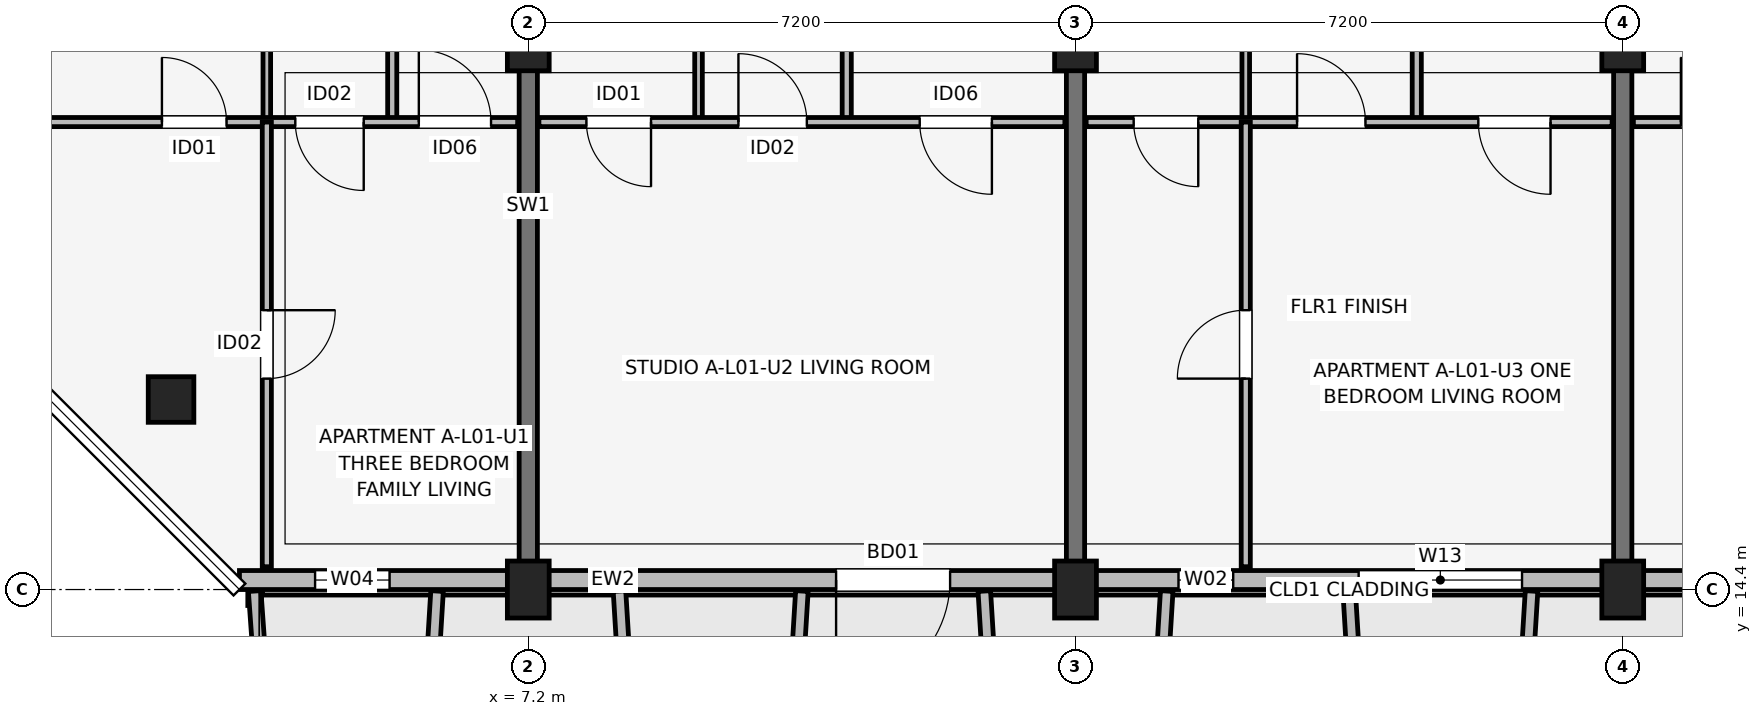
"""IFC4 building model, lengths in metres.
Left out: names, types, materials, properties, quantities, classifications, styles, units other than length and angle.
Written with IfcOpenShell. Run it as: python <this file> out.ifc"""

import sys

from ifc_helpers import new_model, si_unit, direction, frame, frame_2d, origin, origin_2d, place, context, subcontext, project, spatial, rectangle, extrude, element, fill, save


model = new_model("IFC4")
c1 = context("Model", 3, precision=1e-05, world=origin(), true_north=direction((0.0, 1.0)))
c2 = subcontext(c1, "Body", "Model", "MODEL_VIEW")
j1 = project(units=[si_unit("LENGTHUNIT", "METRE"), si_unit("PLANEANGLEUNIT", "RADIAN")], contexts=[c1])
p1 = place(None, origin())
s1 = spatial("IfcSite", under=j1, at=p1, CompositionType="ELEMENT")
p2 = place(p1, origin())
s2 = spatial("IfcBuilding", under=s1, at=p2, CompositionType="ELEMENT")
p3 = place(p2, frame((0.0, 0.0, 4.5)))
s3 = spatial("IfcBuildingStorey", under=s2, at=p3, CompositionType="ELEMENT", Elevation=4.5)
p4 = place(p3, frame((2.5, 16.9, 0.0), z_axis=(0.0, 0.0, 1.0), x_axis=(1.0, 0.0, 0.0)))
e1 = element("IfcColumn", 1, at=p4, inside=s3, PredefinedType="COLUMN", context=c2, shape_type="SweptSolid", body=[
    extrude(rectangle(XDim=0.6, YDim=0.6, at=origin_2d()), origin(), (0.0, 0.0, 1.0), 4.2),
])
for number, where, z_axis, x_axis in (
    (2, (7.2, 14.4, 0.0), (0.0, 0.0, 1.0), (1.0, 0.0, 0.0)),
    (3, (7.2, 21.6, 0.0), (0.0, 0.0, 1.0), (1.0, 0.0, 0.0)),
    (4, (14.4, 14.4, 0.0), (0.0, 0.0, 1.0), (1.0, 0.0, 0.0)),
    (5, (14.4, 21.6, 0.0), (0.0, 0.0, 1.0), (1.0, 0.0, 0.0)),
    (6, (21.6, 14.4, 0.0), (0.0, 0.0, 1.0), (1.0, 0.0, 0.0)),
    (7, (21.6, 21.6, 0.0), (0.0, 0.0, 1.0), (1.0, 0.0, 0.0)),
):
    element("IfcColumn", number, at=place(p3, frame(where, z_axis=z_axis, x_axis=x_axis)), inside=s3, PredefinedType="COLUMN", context=c2, shape_type="SweptSolid", body=[
        extrude(rectangle(XDim=0.55, YDim=0.75, at=origin_2d()), origin(), (0.0, 0.0, 1.0), 4.2),
    ])
for number, where, z_axis, x_axis in (
    (8, (7.2, 14.75, 0.0), (0.0, 0.0, 1.0), (0.0, 1.0, 0.0)),
    (9, (14.4, 14.75, 0.0), (0.0, 0.0, 1.0), (0.0, 1.0, 0.0)),
    (10, (21.6, 14.75, 0.0), (0.0, 0.0, 1.0), (0.0, 1.0, 0.0)),
):
    element("IfcWall", number, at=place(p3, frame(where, z_axis=z_axis, x_axis=x_axis)), inside=s3, PredefinedType="SHEAR", context=c2, shape_type="SweptSolid", body=[
        extrude(rectangle(XDim=9.4, YDim=0.24, at=frame_2d((4.7, 0.0))), origin(), (0.0, 0.0, 1.0), 4.2),
    ])
p5 = place(p3, frame((3.4, 14.525, 0.0), z_axis=(0.0, 0.0, 1.0), x_axis=(1.0, 0.0, 0.0)))
e11 = element("IfcWall", 11, at=p5, inside=s3, PredefinedType="SOLIDWALL", context=c2, shape_type="SweptSolid", body=[
    extrude(rectangle(XDim=29.2, YDim=0.25, at=frame_2d((14.6, 0.0))), origin(), (0.0, 0.0, 1.0), 3.48),
])
p6 = place(p5, frame((9.35, 0.0, 0.0), z_axis=(0.0, 0.0, 1.0), x_axis=(-1.0, 0.0, 0.0)))
e12 = element("IfcOpeningElement", 12, at=p6, cuts=e11, PredefinedType="OPENING", context=c2, shape_type="SweptSolid", body=[
    extrude(rectangle(XDim=1.5, YDim=2.15, at=frame_2d((0.75, 1.075))), frame((0.0, 0.135, 0.0), z_axis=(0.0, -1.0, 0.0), x_axis=(1.0, 0.0, 0.0)), (0.0, 0.0, 1.0), 0.27),
])
p7 = place(p5, frame((23.9, 0.0, 0.0), z_axis=(0.0, 0.0, 1.0), x_axis=(-1.0, 0.0, 0.0)))
e13 = element("IfcOpeningElement", 13, at=p7, cuts=e11, PredefinedType="OPENING", context=c2, shape_type="SweptSolid", body=[
    extrude(rectangle(XDim=1.8, YDim=2.15, at=frame_2d((0.9, 1.075))), frame((0.0, 0.135, 0.0), z_axis=(0.0, -1.0, 0.0), x_axis=(1.0, 0.0, 0.0)), (0.0, 0.0, 1.0), 0.27),
])
p8 = place(p5, frame((0.995, 0.0, 0.75)))
e14 = element("IfcOpeningElement", 14, at=p8, cuts=e11, PredefinedType="OPENING", context=c2, shape_type="SweptSolid", body=[
    extrude(rectangle(XDim=0.98, YDim=1.45, at=frame_2d((0.49, 0.725))), frame((0.0, 0.135, 0.0), z_axis=(0.0, -1.0, 0.0), x_axis=(1.0, 0.0, 0.0)), (0.0, 0.0, 1.0), 0.27),
])
p9 = place(p5, frame((12.355, 0.0, 0.75)))
e15 = element("IfcOpeningElement", 15, at=p9, cuts=e11, PredefinedType="OPENING", context=c2, shape_type="SweptSolid", body=[
    extrude(rectangle(XDim=0.72, YDim=1.35, at=frame_2d((0.36, 0.675))), frame((0.0, 0.135, 0.0), z_axis=(0.0, -1.0, 0.0), x_axis=(1.0, 0.0, 0.0)), (0.0, 0.0, 1.0), 0.27),
])
p10 = place(p5, frame((14.725, 0.0, 0.7)))
e16 = element("IfcOpeningElement", 16, at=p10, cuts=e11, PredefinedType="OPENING", context=c2, shape_type="SweptSolid", body=[
    extrude(rectangle(XDim=2.15, YDim=1.65, at=frame_2d((1.075, 0.825))), frame((0.0, 0.135, 0.0), z_axis=(0.0, -1.0, 0.0), x_axis=(1.0, 0.0, 0.0)), (0.0, 0.0, 1.0), 0.27),
])
p11 = place(p3, frame((3.6, 14.38, 0.0), z_axis=(0.0, 0.0, 1.0), x_axis=(0.071194071069, -0.997462482625, 0.0)))
e17 = element("IfcWall", 17, at=p11, inside=s3, PredefinedType="ELEMENTEDWALL", context=c2, shape_type="SweptSolid", body=[
    extrude(rectangle(XDim=1.965, YDim=0.165, at=frame_2d((0.982, 0.0))), origin(), (0.0, 0.0, 1.0), 4.0),
])
p12 = place(p3, frame((6.0, 14.38, 0.0), z_axis=(0.0, 0.0, 1.0), x_axis=(-0.061170732449, -0.998127317276, 0.0)))
e18 = element("IfcWall", 18, at=p12, inside=s3, PredefinedType="ELEMENTEDWALL", context=c2, shape_type="SweptSolid", body=[
    extrude(rectangle(XDim=1.964, YDim=0.165, at=frame_2d((0.982, 0.0))), origin(), (0.0, 0.0, 1.0), 4.0),
])
for number, where, z_axis, x_axis in (
    (19, (8.4, 14.38, 0.0), (0.0, 0.0, 1.0), (0.061, -0.998, 0.0)),
    (20, (10.8, 14.38, 0.0), (0.0, 0.0, 1.0), (-0.061, -0.998, 0.0)),
    (21, (13.2, 14.38, 0.0), (0.0, 0.0, 1.0), (0.061, -0.998, 0.0)),
):
    element("IfcWall", number, at=place(p3, frame(where, z_axis=z_axis, x_axis=x_axis)), inside=s3, PredefinedType="ELEMENTEDWALL", context=c2, shape_type="SweptSolid", body=[
        extrude(rectangle(XDim=1.964, YDim=0.165, at=frame_2d((0.982, 0.0))), origin(), (0.0, 0.0, 1.0), 3.58),
    ])
for number, where, z_axis, x_axis in (
    (22, (15.6, 14.38, 0.0), (0.0, 0.0, 1.0), (-0.061, -0.998, 0.0)),
    (23, (18.0, 14.38, 0.0), (0.0, 0.0, 1.0), (0.061, -0.998, 0.0)),
    (24, (20.4, 14.38, 0.0), (0.0, 0.0, 1.0), (-0.061, -0.998, 0.0)),
):
    element("IfcWall", number, at=place(p3, frame(where, z_axis=z_axis, x_axis=x_axis)), inside=s3, PredefinedType="ELEMENTEDWALL", context=c2, shape_type="SweptSolid", body=[
        extrude(rectangle(XDim=1.964, YDim=0.165, at=frame_2d((0.982, 0.0))), origin(), (0.0, 0.0, 1.0), 3.6),
    ])
p13 = place(p3, frame((3.76, 20.55, 0.0), z_axis=(0.0, 0.0, 1.0), x_axis=(0.0, 1.0, 0.0)))
e25 = element("IfcWall", 25, at=p13, inside=s3, PredefinedType="PARTITIONING", context=c2, shape_type="SweptSolid", body=[
    extrude(rectangle(XDim=3.75, YDim=0.1, at=frame_2d((1.875, 0.0))), origin(), (0.0, 0.0, 1.0), 3.25),
])
p14 = place(p3, frame((5.41, 20.55, 0.0), z_axis=(0.0, 0.0, 1.0), x_axis=(0.0, 1.0, 0.0)))
e26 = element("IfcWall", 26, at=p14, inside=s3, PredefinedType="PARTITIONING", context=c2, shape_type="SweptSolid", body=[
    extrude(rectangle(XDim=3.75, YDim=0.12, at=frame_2d((1.875, 0.0))), origin(), (0.0, 0.0, 1.0), 3.25),
])
p15 = place(p3, frame((0.14, 20.55, 0.0), z_axis=(0.0, 0.0, 1.0), x_axis=(1.0, 0.0, 0.0)))
e27 = element("IfcWall", 27, at=p15, inside=s3, PredefinedType="PARTITIONING", context=c2, shape_type="SweptSolid", body=[
    extrude(rectangle(XDim=6.92, YDim=0.12, at=frame_2d((3.46, 0.0))), origin(), (0.0, 0.0, 1.0), 3.25),
])
p16 = place(p15, frame((2.24, 0.0, 0.0)))
e28 = element("IfcOpeningElement", 28, at=p16, cuts=e27, PredefinedType="OPENING", context=c2, shape_type="SweptSolid", body=[
    extrude(rectangle(XDim=0.85, YDim=2.08, at=frame_2d((0.425, 1.04))), frame((0.0, 0.07, 0.0), z_axis=(0.0, -1.0, 0.0), x_axis=(1.0, 0.0, 0.0)), (0.0, 0.0, 1.0), 0.14),
])
p17 = place(p15, frame((4.895, 0.0, 0.0), z_axis=(0.0, 0.0, 1.0), x_axis=(-1.0, 0.0, 0.0)))
e29 = element("IfcOpeningElement", 29, at=p17, cuts=e27, PredefinedType="OPENING", context=c2, shape_type="SweptSolid", body=[
    extrude(rectangle(XDim=0.9, YDim=2.08, at=frame_2d((0.45, 1.04))), frame((0.0, 0.07, 0.0), z_axis=(0.0, -1.0, 0.0), x_axis=(1.0, 0.0, 0.0)), (0.0, 0.0, 1.0), 0.14),
])
p18 = place(p15, frame((5.62, 0.0, 0.0)))
e30 = element("IfcOpeningElement", 30, at=p18, cuts=e27, PredefinedType="OPENING", context=c2, shape_type="SweptSolid", body=[
    extrude(rectangle(XDim=0.95, YDim=2.08, at=frame_2d((0.475, 1.04))), frame((0.0, 0.07, 0.0), z_axis=(0.0, -1.0, 0.0), x_axis=(1.0, 0.0, 0.0)), (0.0, 0.0, 1.0), 0.14),
])
p19 = place(p3, frame((3.76, 14.7, 0.0), z_axis=(0.0, 0.0, 1.0), x_axis=(0.0, 1.0, 0.0)))
e31 = element("IfcWall", 31, at=p19, inside=s3, PredefinedType="PARTITIONING", context=c2, shape_type="SweptSolid", body=[
    extrude(rectangle(XDim=5.85, YDim=0.12, at=frame_2d((2.925, 0.0))), origin(), (0.0, 0.0, 1.0), 3.25),
])
p20 = place(p19, frame((3.375, 0.0, 0.0), z_axis=(0.0, 0.0, 1.0), x_axis=(-1.0, 0.0, 0.0)))
e32 = element("IfcOpeningElement", 32, at=p20, cuts=e31, PredefinedType="OPENING", context=c2, shape_type="SweptSolid", body=[
    extrude(rectangle(XDim=0.9, YDim=2.08, at=frame_2d((0.45, 1.04))), frame((0.0, 0.07, 0.0), z_axis=(0.0, -1.0, 0.0), x_axis=(1.0, 0.0, 0.0)), (0.0, 0.0, 1.0), 0.14),
])
p21 = place(p3, frame((9.44, 20.55, 0.0), z_axis=(0.0, 0.0, 1.0), x_axis=(0.0, 1.0, 0.0)))
e33 = element("IfcWall", 33, at=p21, inside=s3, PredefinedType="PARTITIONING", context=c2, shape_type="SweptSolid", body=[
    extrude(rectangle(XDim=3.75, YDim=0.1, at=frame_2d((1.875, 0.0))), origin(), (0.0, 0.0, 1.0), 3.25),
])
p22 = place(p3, frame((11.39, 20.55, 0.0), z_axis=(0.0, 0.0, 1.0), x_axis=(0.0, 1.0, 0.0)))
e34 = element("IfcWall", 34, at=p22, inside=s3, PredefinedType="PARTITIONING", context=c2, shape_type="SweptSolid", body=[
    extrude(rectangle(XDim=3.75, YDim=0.12, at=frame_2d((1.875, 0.0))), origin(), (0.0, 0.0, 1.0), 3.25),
])
p23 = place(p3, frame((7.34, 20.55, 0.0), z_axis=(0.0, 0.0, 1.0), x_axis=(1.0, 0.0, 0.0)))
e35 = element("IfcWall", 35, at=p23, inside=s3, PredefinedType="PARTITIONING", context=c2, shape_type="SweptSolid", body=[
    extrude(rectangle(XDim=6.92, YDim=0.12, at=frame_2d((3.46, 0.0))), origin(), (0.0, 0.0, 1.0), 3.25),
])
p24 = place(p23, frame((1.475, 0.0, 0.0), z_axis=(0.0, 0.0, 1.0), x_axis=(-1.0, 0.0, 0.0)))
e36 = element("IfcOpeningElement", 36, at=p24, cuts=e35, PredefinedType="OPENING", context=c2, shape_type="SweptSolid", body=[
    extrude(rectangle(XDim=0.85, YDim=2.08, at=frame_2d((0.425, 1.04))), frame((0.0, 0.07, 0.0), z_axis=(0.0, -1.0, 0.0), x_axis=(1.0, 0.0, 0.0)), (0.0, 0.0, 1.0), 0.14),
])
p25 = place(p23, frame((2.625, 0.0, 0.0)))
e37 = element("IfcOpeningElement", 37, at=p25, cuts=e35, PredefinedType="OPENING", context=c2, shape_type="SweptSolid", body=[
    extrude(rectangle(XDim=0.9, YDim=2.08, at=frame_2d((0.45, 1.04))), frame((0.0, 0.07, 0.0), z_axis=(0.0, -1.0, 0.0), x_axis=(1.0, 0.0, 0.0)), (0.0, 0.0, 1.0), 0.14),
])
p26 = place(p23, frame((5.96, 0.0, 0.0), z_axis=(0.0, 0.0, 1.0), x_axis=(-1.0, 0.0, 0.0)))
e38 = element("IfcOpeningElement", 38, at=p26, cuts=e35, PredefinedType="OPENING", context=c2, shape_type="SweptSolid", body=[
    extrude(rectangle(XDim=0.95, YDim=2.08, at=frame_2d((0.475, 1.04))), frame((0.0, 0.07, 0.0), z_axis=(0.0, -1.0, 0.0), x_axis=(1.0, 0.0, 0.0)), (0.0, 0.0, 1.0), 0.14),
])
p27 = place(p3, frame((16.64, 20.55, 0.0), z_axis=(0.0, 0.0, 1.0), x_axis=(0.0, 1.0, 0.0)))
e39 = element("IfcWall", 39, at=p27, inside=s3, PredefinedType="PARTITIONING", context=c2, shape_type="SweptSolid", body=[
    extrude(rectangle(XDim=3.75, YDim=0.1, at=frame_2d((1.875, 0.0))), origin(), (0.0, 0.0, 1.0), 3.25),
])
p28 = place(p3, frame((18.89, 20.55, 0.0), z_axis=(0.0, 0.0, 1.0), x_axis=(0.0, 1.0, 0.0)))
e40 = element("IfcWall", 40, at=p28, inside=s3, PredefinedType="PARTITIONING", context=c2, shape_type="SweptSolid", body=[
    extrude(rectangle(XDim=3.75, YDim=0.12, at=frame_2d((1.875, 0.0))), origin(), (0.0, 0.0, 1.0), 3.25),
])
p29 = place(p3, frame((14.54, 20.55, 0.0), z_axis=(0.0, 0.0, 1.0), x_axis=(1.0, 0.0, 0.0)))
e41 = element("IfcWall", 41, at=p29, inside=s3, PredefinedType="PARTITIONING", context=c2, shape_type="SweptSolid", body=[
    extrude(rectangle(XDim=6.92, YDim=0.12, at=frame_2d((3.46, 0.0))), origin(), (0.0, 0.0, 1.0), 3.25),
])
p30 = place(p29, frame((1.475, 0.0, 0.0), z_axis=(0.0, 0.0, 1.0), x_axis=(-1.0, 0.0, 0.0)))
e42 = element("IfcOpeningElement", 42, at=p30, cuts=e41, PredefinedType="OPENING", context=c2, shape_type="SweptSolid", body=[
    extrude(rectangle(XDim=0.85, YDim=2.08, at=frame_2d((0.425, 1.04))), frame((0.0, 0.07, 0.0), z_axis=(0.0, -1.0, 0.0), x_axis=(1.0, 0.0, 0.0)), (0.0, 0.0, 1.0), 0.14),
])
p31 = place(p29, frame((2.775, 0.0, 0.0)))
e43 = element("IfcOpeningElement", 43, at=p31, cuts=e41, PredefinedType="OPENING", context=c2, shape_type="SweptSolid", body=[
    extrude(rectangle(XDim=0.9, YDim=2.08, at=frame_2d((0.45, 1.04))), frame((0.0, 0.07, 0.0), z_axis=(0.0, -1.0, 0.0), x_axis=(1.0, 0.0, 0.0)), (0.0, 0.0, 1.0), 0.14),
])
p32 = place(p29, frame((6.11, 0.0, 0.0), z_axis=(0.0, 0.0, 1.0), x_axis=(-1.0, 0.0, 0.0)))
e44 = element("IfcOpeningElement", 44, at=p32, cuts=e41, PredefinedType="OPENING", context=c2, shape_type="SweptSolid", body=[
    extrude(rectangle(XDim=0.95, YDim=2.08, at=frame_2d((0.475, 1.04))), frame((0.0, 0.07, 0.0), z_axis=(0.0, -1.0, 0.0), x_axis=(1.0, 0.0, 0.0)), (0.0, 0.0, 1.0), 0.14),
])
p33 = place(p3, frame((16.64, 14.7, 0.0), z_axis=(0.0, 0.0, 1.0), x_axis=(0.0, 1.0, 0.0)))
e45 = element("IfcWall", 45, at=p33, inside=s3, PredefinedType="PARTITIONING", context=c2, shape_type="SweptSolid", body=[
    extrude(rectangle(XDim=5.85, YDim=0.12, at=frame_2d((2.925, 0.0))), origin(), (0.0, 0.0, 1.0), 3.25),
])
p34 = place(p33, frame((2.475, 0.0, 0.0)))
e46 = element("IfcOpeningElement", 46, at=p34, cuts=e45, PredefinedType="OPENING", context=c2, shape_type="SweptSolid", body=[
    extrude(rectangle(XDim=0.9, YDim=2.08, at=frame_2d((0.45, 1.04))), frame((0.0, 0.07, 0.0), z_axis=(0.0, -1.0, 0.0), x_axis=(1.0, 0.0, 0.0)), (0.0, 0.0, 1.0), 0.14),
])
p35 = place(p3, frame((21.74, 20.55, 0.0), z_axis=(0.0, 0.0, 1.0), x_axis=(1.0, 0.0, 0.0)))
e47 = element("IfcWall", 47, at=p35, inside=s3, PredefinedType="PARTITIONING", context=c2, shape_type="SweptSolid", body=[
    extrude(rectangle(XDim=6.92, YDim=0.12, at=frame_2d((3.46, 0.0))), origin(), (0.0, 0.0, 1.0), 3.25),
])
p36 = place(p35, frame((0.625, 0.0, 0.0)))
e48 = element("IfcOpeningElement", 48, at=p36, cuts=e47, PredefinedType="OPENING", context=c2, shape_type="SweptSolid", body=[
    extrude(rectangle(XDim=0.85, YDim=2.08, at=frame_2d((0.425, 1.04))), frame((0.0, 0.07, 0.0), z_axis=(0.0, -1.0, 0.0), x_axis=(1.0, 0.0, 0.0)), (0.0, 0.0, 1.0), 0.14),
])
p37 = place(p35, frame((3.525, 0.0, 0.0), z_axis=(0.0, 0.0, 1.0), x_axis=(-1.0, 0.0, 0.0)))
e49 = element("IfcOpeningElement", 49, at=p37, cuts=e47, PredefinedType="OPENING", context=c2, shape_type="SweptSolid", body=[
    extrude(rectangle(XDim=0.9, YDim=2.08, at=frame_2d((0.45, 1.04))), frame((0.0, 0.07, 0.0), z_axis=(0.0, -1.0, 0.0), x_axis=(1.0, 0.0, 0.0)), (0.0, 0.0, 1.0), 0.14),
])
p38 = place(p35, frame((5.01, 0.0, 0.0)))
e50 = element("IfcOpeningElement", 50, at=p38, cuts=e47, PredefinedType="OPENING", context=c2, shape_type="SweptSolid", body=[
    extrude(rectangle(XDim=0.95, YDim=2.08, at=frame_2d((0.475, 1.04))), frame((0.0, 0.07, 0.0), z_axis=(0.0, -1.0, 0.0), x_axis=(1.0, 0.0, 0.0)), (0.0, 0.0, 1.0), 0.14),
])
p39 = place(p6, origin())
e51 = element("IfcDoor", 51, at=p39, inside=s3, OperationType="SINGLE_SWING_LEFT", PredefinedType="DOOR", context=c2, shape_type="SweptSolid", body=[
    extrude(rectangle(XDim=1.5, YDim=2.15, at=frame_2d((0.75, 1.075))), frame((0.0, 0.025, 0.0), z_axis=(0.0, -1.0, 0.0), x_axis=(1.0, 0.0, 0.0)), (0.0, 0.0, 1.0), 0.05),
])
fill(e12, e51)
p40 = place(p8, origin())
e52 = element("IfcWindow", 52, at=p40, inside=s3, PartitioningType="SINGLE_PANEL", PredefinedType="WINDOW", context=c2, shape_type="SweptSolid", body=[
    extrude(rectangle(XDim=0.98, YDim=1.45, at=frame_2d((0.49, 0.725))), frame((0.0, 0.03, 0.0), z_axis=(0.0, -1.0, 0.0), x_axis=(1.0, 0.0, 0.0)), (0.0, 0.0, 1.0), 0.06),
])
fill(e14, e52)
p41 = place(p9, origin())
e53 = element("IfcWindow", 53, at=p41, inside=s3, PartitioningType="SINGLE_PANEL", PredefinedType="WINDOW", context=c2, shape_type="SweptSolid", body=[
    extrude(rectangle(XDim=0.72, YDim=1.35, at=frame_2d((0.36, 0.675))), frame((0.0, 0.03, 0.0), z_axis=(0.0, -1.0, 0.0), x_axis=(1.0, 0.0, 0.0)), (0.0, 0.0, 1.0), 0.06),
])
fill(e15, e53)
p42 = place(p10, origin())
e54 = element("IfcWindow", 54, at=p42, inside=s3, PartitioningType="SINGLE_PANEL", PredefinedType="WINDOW", context=c2, shape_type="SweptSolid", body=[
    extrude(rectangle(XDim=2.15, YDim=1.65, at=frame_2d((1.075, 0.825))), frame((0.0, 0.03, 0.0), z_axis=(0.0, -1.0, 0.0), x_axis=(1.0, 0.0, 0.0)), (0.0, 0.0, 1.0), 0.06),
])
fill(e16, e54)
p43 = place(p16, origin())
e55 = element("IfcDoor", 55, at=p43, inside=s3, OperationType="SINGLE_SWING_LEFT", PredefinedType="DOOR", context=c2, shape_type="SweptSolid", body=[
    extrude(rectangle(XDim=0.85, YDim=2.08, at=frame_2d((0.425, 1.04))), frame((0.0, 0.025, 0.0), z_axis=(0.0, -1.0, 0.0), x_axis=(1.0, 0.0, 0.0)), (0.0, 0.0, 1.0), 0.05),
])
fill(e28, e55)
p44 = place(p17, origin())
e56 = element("IfcDoor", 56, at=p44, inside=s3, OperationType="SINGLE_SWING_RIGHT", PredefinedType="DOOR", context=c2, shape_type="SweptSolid", body=[
    extrude(rectangle(XDim=0.9, YDim=2.08, at=frame_2d((0.45, 1.04))), frame((0.0, 0.025, 0.0), z_axis=(0.0, -1.0, 0.0), x_axis=(1.0, 0.0, 0.0)), (0.0, 0.0, 1.0), 0.05),
])
fill(e29, e56)
p45 = place(p18, origin())
e57 = element("IfcDoor", 57, at=p45, inside=s3, OperationType="SINGLE_SWING_LEFT", PredefinedType="DOOR", context=c2, shape_type="SweptSolid", body=[
    extrude(rectangle(XDim=0.95, YDim=2.08, at=frame_2d((0.475, 1.04))), frame((0.0, 0.025, 0.0), z_axis=(0.0, -1.0, 0.0), x_axis=(1.0, 0.0, 0.0)), (0.0, 0.0, 1.0), 0.05),
])
fill(e30, e57)
p46 = place(p20, origin())
e58 = element("IfcDoor", 58, at=p46, inside=s3, OperationType="SINGLE_SWING_RIGHT", PredefinedType="DOOR", context=c2, shape_type="SweptSolid", body=[
    extrude(rectangle(XDim=0.9, YDim=2.08, at=frame_2d((0.45, 1.04))), frame((0.0, 0.025, 0.0), z_axis=(0.0, -1.0, 0.0), x_axis=(1.0, 0.0, 0.0)), (0.0, 0.0, 1.0), 0.05),
])
fill(e32, e58)
p47 = place(p24, origin())
e59 = element("IfcDoor", 59, at=p47, inside=s3, OperationType="SINGLE_SWING_RIGHT", PredefinedType="DOOR", context=c2, shape_type="SweptSolid", body=[
    extrude(rectangle(XDim=0.85, YDim=2.08, at=frame_2d((0.425, 1.04))), frame((0.0, 0.025, 0.0), z_axis=(0.0, -1.0, 0.0), x_axis=(1.0, 0.0, 0.0)), (0.0, 0.0, 1.0), 0.05),
])
fill(e36, e59)
p48 = place(p25, origin())
e60 = element("IfcDoor", 60, at=p48, inside=s3, OperationType="SINGLE_SWING_LEFT", PredefinedType="DOOR", context=c2, shape_type="SweptSolid", body=[
    extrude(rectangle(XDim=0.9, YDim=2.08, at=frame_2d((0.45, 1.04))), frame((0.0, 0.025, 0.0), z_axis=(0.0, -1.0, 0.0), x_axis=(1.0, 0.0, 0.0)), (0.0, 0.0, 1.0), 0.05),
])
fill(e37, e60)
p49 = place(p26, origin())
e61 = element("IfcDoor", 61, at=p49, inside=s3, OperationType="SINGLE_SWING_RIGHT", PredefinedType="DOOR", context=c2, shape_type="SweptSolid", body=[
    extrude(rectangle(XDim=0.95, YDim=2.08, at=frame_2d((0.475, 1.04))), frame((0.0, 0.025, 0.0), z_axis=(0.0, -1.0, 0.0), x_axis=(1.0, 0.0, 0.0)), (0.0, 0.0, 1.0), 0.05),
])
fill(e38, e61)
p50 = place(p30, origin())
e62 = element("IfcDoor", 62, at=p50, inside=s3, OperationType="SINGLE_SWING_RIGHT", PredefinedType="DOOR", context=c2, shape_type="SweptSolid", body=[
    extrude(rectangle(XDim=0.85, YDim=2.08, at=frame_2d((0.425, 1.04))), frame((0.0, 0.025, 0.0), z_axis=(0.0, -1.0, 0.0), x_axis=(1.0, 0.0, 0.0)), (0.0, 0.0, 1.0), 0.05),
])
fill(e42, e62)
p51 = place(p31, origin())
e63 = element("IfcDoor", 63, at=p51, inside=s3, OperationType="SINGLE_SWING_LEFT", PredefinedType="DOOR", context=c2, shape_type="SweptSolid", body=[
    extrude(rectangle(XDim=0.9, YDim=2.08, at=frame_2d((0.45, 1.04))), frame((0.0, 0.025, 0.0), z_axis=(0.0, -1.0, 0.0), x_axis=(1.0, 0.0, 0.0)), (0.0, 0.0, 1.0), 0.05),
])
fill(e43, e63)
p52 = place(p32, origin())
e64 = element("IfcDoor", 64, at=p52, inside=s3, OperationType="SINGLE_SWING_RIGHT", PredefinedType="DOOR", context=c2, shape_type="SweptSolid", body=[
    extrude(rectangle(XDim=0.95, YDim=2.08, at=frame_2d((0.475, 1.04))), frame((0.0, 0.025, 0.0), z_axis=(0.0, -1.0, 0.0), x_axis=(1.0, 0.0, 0.0)), (0.0, 0.0, 1.0), 0.05),
])
fill(e44, e64)
p53 = place(p34, origin())
e65 = element("IfcDoor", 65, at=p53, inside=s3, OperationType="SINGLE_SWING_LEFT", PredefinedType="DOOR", context=c2, shape_type="SweptSolid", body=[
    extrude(rectangle(XDim=0.9, YDim=2.08, at=frame_2d((0.45, 1.04))), frame((0.0, 0.025, 0.0), z_axis=(0.0, -1.0, 0.0), x_axis=(1.0, 0.0, 0.0)), (0.0, 0.0, 1.0), 0.05),
])
fill(e46, e65)
p54 = place(p36, origin())
e66 = element("IfcDoor", 66, at=p54, inside=s3, OperationType="SINGLE_SWING_LEFT", PredefinedType="DOOR", context=c2, shape_type="SweptSolid", body=[
    extrude(rectangle(XDim=0.85, YDim=2.08, at=frame_2d((0.425, 1.04))), frame((0.0, 0.025, 0.0), z_axis=(0.0, -1.0, 0.0), x_axis=(1.0, 0.0, 0.0)), (0.0, 0.0, 1.0), 0.05),
])
fill(e48, e66)
save(model, sys.argv[1])
